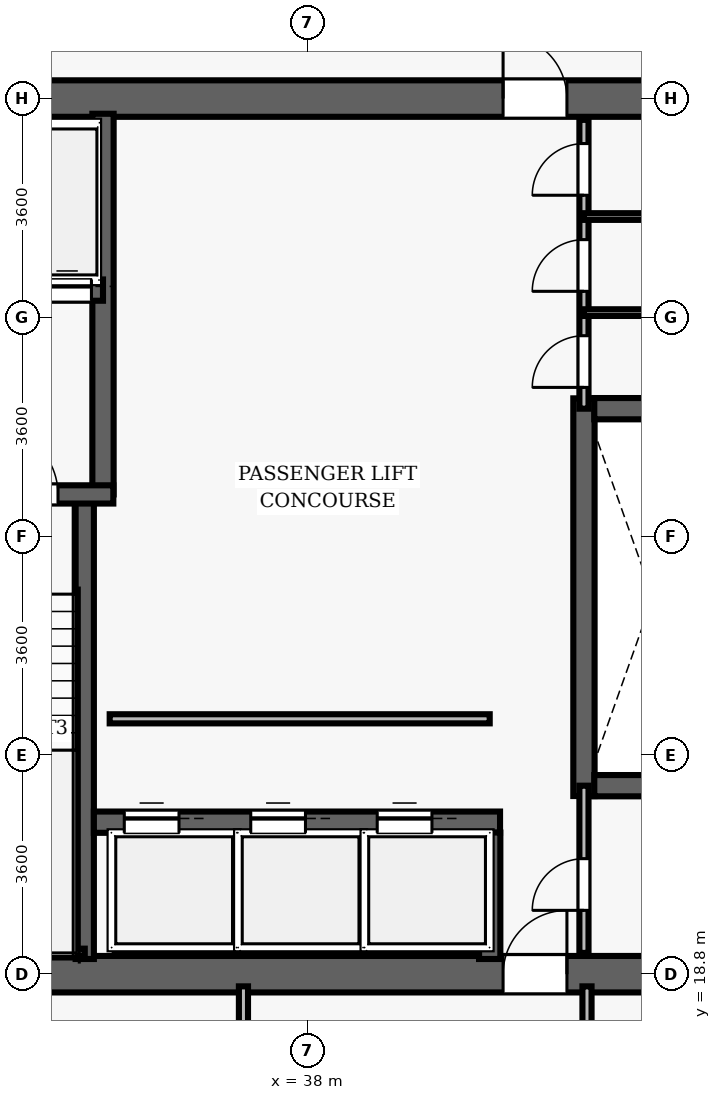
"""IFC4 building model, lengths in metres.
Left out: names, types, materials, properties, quantities, classifications, styles, units other than length and angle.
Written with IfcOpenShell. Run it as: python <this file> out.ifc"""

import sys

from ifc_helpers import new_model, si_unit, direction, frame, frame_2d, origin, place, context, subcontext, project, spatial, rectangle, extrude, element, fill, save


model = new_model("IFC4")
c1 = context("Model", 3, precision=1e-05, world=origin(), true_north=direction((0.0, 1.0)))
c2 = subcontext(c1, "Body", "Model", "MODEL_VIEW")
j1 = project(units=[si_unit("LENGTHUNIT", "METRE"), si_unit("PLANEANGLEUNIT", "RADIAN")], contexts=[c1])
p1 = place(None, origin())
s1 = spatial("IfcSite", under=j1, at=p1, CompositionType="ELEMENT")
p2 = place(p1, origin())
s2 = spatial("IfcBuilding", under=s1, at=p2, CompositionType="ELEMENT")
p3 = place(p2, frame((0.0, 0.0, 158.8)))
s3 = spatial("IfcBuildingStorey", under=s2, at=p3, CompositionType="ELEMENT", Elevation=158.8)
p4 = place(p3, frame((26.7, 18.8, 0.0), z_axis=(0.0, 0.0, 1.0), x_axis=(1.0, 0.0, 0.0)))
e1 = element("IfcWall", 1, at=p4, inside=s3, PredefinedType="SHEAR", context=c2, shape_type="SweptSolid", body=[
    extrude(rectangle(XDim=22.6, YDim=0.6, at=frame_2d((11.3, 0.0))), origin(), (0.0, 0.0, 1.0), 3.5),
])
p5 = place(p4, frame((14.52, 0.0, 0.0)))
e2 = element("IfcOpeningElement", 2, at=p5, cuts=e1, PredefinedType="OPENING", context=c2, shape_type="SweptSolid", body=[
    extrude(rectangle(XDim=1.05, YDim=2.15, at=frame_2d((0.525, 1.075))), frame((0.0, 0.31, 0.0), z_axis=(0.0, -1.0, 0.0), x_axis=(1.0, 0.0, 0.0)), (0.0, 0.0, 1.0), 0.62),
])
p6 = place(p3, frame((26.7, 33.2, 0.0), z_axis=(0.0, 0.0, 1.0), x_axis=(1.0, 0.0, 0.0)))
e3 = element("IfcWall", 3, at=p6, inside=s3, PredefinedType="SHEAR", context=c2, shape_type="SweptSolid", body=[
    extrude(rectangle(XDim=22.6, YDim=0.6, at=frame_2d((11.3, 0.0))), origin(), (0.0, 0.0, 1.0), 3.5),
])
p7 = place(p6, frame((4.62, 0.0, 0.0)))
e4 = element("IfcOpeningElement", 4, at=p7, cuts=e3, PredefinedType="OPENING", context=c2, shape_type="SweptSolid", body=[
    extrude(rectangle(XDim=1.05, YDim=2.15, at=frame_2d((0.525, 1.075))), frame((0.0, 0.31, 0.0), z_axis=(0.0, -1.0, 0.0), x_axis=(1.0, 0.0, 0.0)), (0.0, 0.0, 1.0), 0.62),
])
p8 = place(p6, frame((14.52, 0.0, 0.0)))
e5 = element("IfcOpeningElement", 5, at=p8, cuts=e3, PredefinedType="OPENING", context=c2, shape_type="SweptSolid", body=[
    extrude(rectangle(XDim=1.05, YDim=2.15, at=frame_2d((0.525, 1.075))), frame((0.0, 0.31, 0.0), z_axis=(0.0, -1.0, 0.0), x_axis=(1.0, 0.0, 0.0)), (0.0, 0.0, 1.0), 0.62),
])
p9 = place(p3, frame((34.34, 19.05, 0.0), z_axis=(0.0, 0.0, 1.0), x_axis=(0.0, 1.0, 0.0)))
e6 = element("IfcWall", 6, at=p9, inside=s3, PredefinedType="SHEAR", context=c2, shape_type="SweptSolid", body=[
    extrude(rectangle(XDim=7.5, YDim=0.3, at=frame_2d((3.75, 0.0))), origin(), (0.0, 0.0, 1.0), 3.5),
])
p10 = place(p3, frame((34.64, 26.69, 0.0), z_axis=(0.0, 0.0, 1.0), x_axis=(0.0, 1.0, 0.0)))
e7 = element("IfcWall", 7, at=p10, inside=s3, PredefinedType="SHEAR", context=c2, shape_type="SweptSolid", body=[
    extrude(rectangle(XDim=6.26, YDim=0.35, at=frame_2d((3.13, 0.0))), origin(), (0.0, 0.0, 1.0), 3.5),
])
p11 = place(p3, frame((31.25, 26.69, 0.0), z_axis=(0.0, 0.0, 1.0), x_axis=(1.0, 0.0, 0.0)))
e8 = element("IfcWall", 8, at=p11, inside=s3, PredefinedType="SHEAR", context=c2, shape_type="SweptSolid", body=[
    extrude(rectangle(XDim=3.56, YDim=0.3, at=frame_2d((1.78, 0.0))), origin(), (0.0, 0.0, 1.0), 3.5),
])
p12 = place(p11, frame((1.55, 0.0, 0.0)))
e9 = element("IfcOpeningElement", 9, at=p12, cuts=e8, PredefinedType="OPENING", context=c2, shape_type="SweptSolid", body=[
    extrude(rectangle(XDim=1.1, YDim=2.15, at=frame_2d((0.55, 1.075))), frame((0.0, 0.16, 0.0), z_axis=(0.0, -1.0, 0.0), x_axis=(1.0, 0.0, 0.0)), (0.0, 0.0, 1.0), 0.32),
])
p13 = place(p3, frame((31.3, 19.16, 0.0), z_axis=(0.0, 0.0, 1.0), x_axis=(1.0, 0.0, 0.0)))
e10 = element("IfcWall", 10, at=p13, inside=s3, PredefinedType="SHEAR", context=c2, shape_type="SweptSolid", body=[
    extrude(rectangle(XDim=3.04, YDim=0.12, at=frame_2d((1.52, 0.0))), origin(), (0.0, 0.0, 1.0), 3.5),
])
p14 = place(p3, frame((32.23, 30.05, 0.0), z_axis=(0.0, 0.0, 1.0), x_axis=(1.0, 0.0, 0.0)))
e11 = element("IfcWall", 11, at=p14, inside=s3, PredefinedType="SHEAR", context=c2, shape_type="SweptSolid", body=[
    extrude(rectangle(XDim=2.41, YDim=0.35, at=frame_2d((1.205, 0.0))), origin(), (0.0, 0.0, 1.0), 2.675),
])
p15 = place(p14, frame((0.42, 0.0, 0.0)))
e12 = element("IfcOpeningElement", 12, at=p15, cuts=e11, PredefinedType="OPENING", context=c2, shape_type="SweptSolid", body=[
    extrude(rectangle(XDim=0.8, YDim=2.15, at=frame_2d((0.4, 1.075))), frame((0.0, 0.185, 0.0), z_axis=(0.0, -1.0, 0.0), x_axis=(1.0, 0.0, 0.0)), (0.0, 0.0, 1.0), 0.37),
])
p16 = place(p14, frame((1.42, 0.0, 0.0)))
e13 = element("IfcOpeningElement", 13, at=p16, cuts=e11, PredefinedType="OPENING", context=c2, shape_type="SweptSolid", body=[
    extrude(rectangle(XDim=0.8, YDim=2.15, at=frame_2d((0.4, 1.075))), frame((0.0, 0.185, 0.0), z_axis=(0.0, -1.0, 0.0), x_axis=(1.0, 0.0, 0.0)), (0.0, 0.0, 1.0), 0.37),
])
p17 = place(p3, frame((42.55, 21.73, 0.0), z_axis=(0.0, 0.0, 1.0), x_axis=(0.0, 1.0, 0.0)))
e14 = element("IfcWall", 14, at=p17, inside=s3, PredefinedType="SHEAR", context=c2, shape_type="SweptSolid", body=[
    extrude(rectangle(XDim=6.54, YDim=0.35, at=frame_2d((3.27, 0.0))), origin(), (0.0, 0.0, 1.0), 2.675),
])
for number, where, z_axis, x_axis in (
    (15, (42.72, 21.9, 0.0), (0.0, 0.0, 1.0), (1.0, 0.0, 0.0)),
    (16, (42.72, 28.1, 0.0), (0.0, 0.0, 1.0), (1.0, 0.0, 0.0)),
):
    element("IfcWall", number, at=place(p3, frame(where, z_axis=z_axis, x_axis=x_axis)), inside=s3, PredefinedType="SHEAR", context=c2, shape_type="SweptSolid", body=[
        extrude(rectangle(XDim=2.03, YDim=0.35, at=frame_2d((1.015, 0.0))), origin(), (0.0, 0.0, 1.0), 2.675),
    ])
p18 = place(p3, frame((34.49, 21.3, 0.0), z_axis=(0.0, 0.0, 1.0), x_axis=(1.0, 0.0, 0.0)))
e17 = element("IfcWall", 17, at=p18, inside=s3, PredefinedType="SHEAR", context=c2, shape_type="SweptSolid", body=[
    extrude(rectangle(XDim=6.68, YDim=0.35, at=frame_2d((3.34, 0.0))), origin(), (0.0, 0.0, 1.0), 2.675),
])
p19 = place(p18, frame((0.5, 0.0, 0.0)))
e18 = element("IfcOpeningElement", 18, at=p19, cuts=e17, PredefinedType="OPENING", context=c2, shape_type="SweptSolid", body=[
    extrude(rectangle(XDim=0.9, YDim=2.15, at=frame_2d((0.45, 1.075))), frame((0.0, 0.185, 0.0), z_axis=(0.0, -1.0, 0.0), x_axis=(1.0, 0.0, 0.0)), (0.0, 0.0, 1.0), 0.37),
])
p20 = place(p18, frame((2.58, 0.0, 0.0)))
e19 = element("IfcOpeningElement", 19, at=p20, cuts=e17, PredefinedType="OPENING", context=c2, shape_type="SweptSolid", body=[
    extrude(rectangle(XDim=0.9, YDim=2.15, at=frame_2d((0.45, 1.075))), frame((0.0, 0.185, 0.0), z_axis=(0.0, -1.0, 0.0), x_axis=(1.0, 0.0, 0.0)), (0.0, 0.0, 1.0), 0.37),
])
p21 = place(p18, frame((4.66, 0.0, 0.0)))
e20 = element("IfcOpeningElement", 20, at=p21, cuts=e17, PredefinedType="OPENING", context=c2, shape_type="SweptSolid", body=[
    extrude(rectangle(XDim=0.9, YDim=2.15, at=frame_2d((0.45, 1.075))), frame((0.0, 0.185, 0.0), z_axis=(0.0, -1.0, 0.0), x_axis=(1.0, 0.0, 0.0)), (0.0, 0.0, 1.0), 0.37),
])
p22 = place(p3, frame((41.0, 19.05, 0.0), z_axis=(0.0, 0.0, 1.0), x_axis=(0.0, 1.0, 0.0)))
e21 = element("IfcWall", 21, at=p22, inside=s3, PredefinedType="SHEAR", context=c2, shape_type="SweptSolid", body=[
    extrude(rectangle(XDim=2.08, YDim=0.35, at=frame_2d((1.04, 0.0))), origin(), (0.0, 0.0, 1.0), 2.675),
])
p23 = place(p3, frame((34.75, 23.0, 0.0), z_axis=(0.0, 0.0, 1.0), x_axis=(1.0, 0.0, 0.0)))
e22 = element("IfcWall", 22, at=p23, inside=s3, PredefinedType="PARTITIONING", context=c2, shape_type="SweptSolid", body=[
    extrude(rectangle(XDim=6.25, YDim=0.15, at=frame_2d((3.125, 0.0))), origin(), (0.0, 0.0, 1.0), 2.675),
])
p24 = place(p3, frame((42.55, 28.1, 0.0), z_axis=(0.0, 0.0, 1.0), x_axis=(0.0, 1.0, 0.0)))
e23 = element("IfcWall", 23, at=p24, inside=s3, PredefinedType="PARTITIONING", context=c2, shape_type="SweptSolid", body=[
    extrude(rectangle(XDim=4.75, YDim=0.15, at=frame_2d((2.375, 0.0))), origin(), (0.0, 0.0, 1.0), 2.675),
])
p25 = place(p24, frame((0.35, 0.0, 0.0)))
e24 = element("IfcOpeningElement", 24, at=p25, cuts=e23, PredefinedType="OPENING", context=c2, shape_type="SweptSolid", body=[
    extrude(rectangle(XDim=0.85, YDim=2.1, at=frame_2d((0.425, 1.05))), frame((0.0, 0.085, 0.0), z_axis=(0.0, -1.0, 0.0), x_axis=(1.0, 0.0, 0.0)), (0.0, 0.0, 1.0), 0.17),
])
p26 = place(p24, frame((1.93, 0.0, 0.0)))
e25 = element("IfcOpeningElement", 25, at=p26, cuts=e23, PredefinedType="OPENING", context=c2, shape_type="SweptSolid", body=[
    extrude(rectangle(XDim=0.85, YDim=2.1, at=frame_2d((0.425, 1.05))), frame((0.0, 0.085, 0.0), z_axis=(0.0, -1.0, 0.0), x_axis=(1.0, 0.0, 0.0)), (0.0, 0.0, 1.0), 0.17),
])
p27 = place(p24, frame((3.51, 0.0, 0.0)))
e26 = element("IfcOpeningElement", 26, at=p27, cuts=e23, PredefinedType="OPENING", context=c2, shape_type="SweptSolid", body=[
    extrude(rectangle(XDim=0.85, YDim=2.1, at=frame_2d((0.425, 1.05))), frame((0.0, 0.085, 0.0), z_axis=(0.0, -1.0, 0.0), x_axis=(1.0, 0.0, 0.0)), (0.0, 0.0, 1.0), 0.17),
])
for number, where, z_axis, x_axis in (
    (27, (42.55, 29.68, 0.0), (0.0, 0.0, 1.0), (1.0, 0.0, 0.0)),
    (28, (42.55, 31.26, 0.0), (0.0, 0.0, 1.0), (1.0, 0.0, 0.0)),
):
    element("IfcWall", number, at=place(p3, frame(where, z_axis=z_axis, x_axis=x_axis)), inside=s3, PredefinedType="PARTITIONING", context=c2, shape_type="SweptSolid", body=[
        extrude(rectangle(XDim=2.2, YDim=0.11, at=frame_2d((1.1, 0.0))), origin(), (0.0, 0.0, 1.0), 2.675),
    ])
p28 = place(p3, frame((42.55, 19.15, 0.0), z_axis=(0.0, 0.0, 1.0), x_axis=(0.0, 1.0, 0.0)))
e29 = element("IfcWall", 29, at=p28, inside=s3, PredefinedType="PARTITIONING", context=c2, shape_type="SweptSolid", body=[
    extrude(rectangle(XDim=2.75, YDim=0.15, at=frame_2d((1.375, 0.0))), origin(), (0.0, 0.0, 1.0), 2.675),
])
p29 = place(p28, frame((0.7, 0.0, 0.0)))
e30 = element("IfcOpeningElement", 30, at=p29, cuts=e29, PredefinedType="OPENING", context=c2, shape_type="SweptSolid", body=[
    extrude(rectangle(XDim=0.85, YDim=2.1, at=frame_2d((0.425, 1.05))), frame((0.0, 0.085, 0.0), z_axis=(0.0, -1.0, 0.0), x_axis=(1.0, 0.0, 0.0)), (0.0, 0.0, 1.0), 0.17),
])
p30 = place(p3, frame((36.95, 11.2, 0.0), z_axis=(0.0, 0.0, 1.0), x_axis=(0.0, 1.0, 0.0)))
e31 = element("IfcWall", 31, at=p30, inside=s3, PredefinedType="PARTITIONING", context=c2, shape_type="SweptSolid", body=[
    extrude(rectangle(XDim=7.4, YDim=0.15, at=frame_2d((3.7, 0.0))), origin(), (0.0, 0.0, 1.0), 2.675),
])
p31 = place(p30, frame((5.075, 0.0, 0.0)))
e32 = element("IfcOpeningElement", 32, at=p31, cuts=e31, PredefinedType="OPENING", context=c2, shape_type="SweptSolid", body=[
    extrude(rectangle(XDim=0.95, YDim=2.15, at=frame_2d((0.475, 1.075))), frame((0.0, 0.085, 0.0), z_axis=(0.0, -1.0, 0.0), x_axis=(1.0, 0.0, 0.0)), (0.0, 0.0, 1.0), 0.17),
])
p32 = place(p3, frame((42.6, 16.65, 0.0), z_axis=(0.0, 0.0, 1.0), x_axis=(0.0, 1.0, 0.0)))
e33 = element("IfcWall", 33, at=p32, inside=s3, PredefinedType="PARTITIONING", context=c2, shape_type="SweptSolid", body=[
    extrude(rectangle(XDim=1.95, YDim=0.15, at=frame_2d((0.975, 0.0))), origin(), (0.0, 0.0, 1.0), 2.675),
])
p33 = place(p12, origin())
e34 = element("IfcDoor", 34, at=p33, inside=s3, OperationType="SINGLE_SWING_LEFT", PredefinedType="DOOR", context=c2, shape_type="SweptSolid", body=[
    extrude(rectangle(XDim=1.1, YDim=2.15, at=frame_2d((0.55, 1.075))), frame((0.0, 0.025, 0.0), z_axis=(0.0, -1.0, 0.0), x_axis=(1.0, 0.0, 0.0)), (0.0, 0.0, 1.0), 0.05),
])
fill(e9, e34)
p34 = place(p8, origin())
e35 = element("IfcDoor", 35, at=p34, inside=s3, OperationType="SINGLE_SWING_LEFT", PredefinedType="DOOR", context=c2, shape_type="SweptSolid", body=[
    extrude(rectangle(XDim=1.05, YDim=2.15, at=frame_2d((0.525, 1.075))), frame((0.0, 0.025, 0.0), z_axis=(0.0, -1.0, 0.0), x_axis=(1.0, 0.0, 0.0)), (0.0, 0.0, 1.0), 0.05),
])
fill(e5, e35)
p35 = place(p5, origin())
e36 = element("IfcDoor", 36, at=p35, inside=s3, OperationType="SINGLE_SWING_RIGHT", PredefinedType="DOOR", context=c2, shape_type="SweptSolid", body=[
    extrude(rectangle(XDim=1.05, YDim=2.15, at=frame_2d((0.525, 1.075))), frame((0.0, 0.025, 0.0), z_axis=(0.0, -1.0, 0.0), x_axis=(1.0, 0.0, 0.0)), (0.0, 0.0, 1.0), 0.05),
])
fill(e2, e36)
p36 = place(p25, origin())
e37 = element("IfcDoor", 37, at=p36, inside=s3, OperationType="SINGLE_SWING_LEFT", PredefinedType="DOOR", context=c2, shape_type="SweptSolid", body=[
    extrude(rectangle(XDim=0.85, YDim=2.1, at=frame_2d((0.425, 1.05))), frame((0.0, 0.025, 0.0), z_axis=(0.0, -1.0, 0.0), x_axis=(1.0, 0.0, 0.0)), (0.0, 0.0, 1.0), 0.05),
])
fill(e24, e37)
p37 = place(p26, origin())
e38 = element("IfcDoor", 38, at=p37, inside=s3, OperationType="SINGLE_SWING_LEFT", PredefinedType="DOOR", context=c2, shape_type="SweptSolid", body=[
    extrude(rectangle(XDim=0.85, YDim=2.1, at=frame_2d((0.425, 1.05))), frame((0.0, 0.025, 0.0), z_axis=(0.0, -1.0, 0.0), x_axis=(1.0, 0.0, 0.0)), (0.0, 0.0, 1.0), 0.05),
])
fill(e25, e38)
p38 = place(p27, origin())
e39 = element("IfcDoor", 39, at=p38, inside=s3, OperationType="SINGLE_SWING_LEFT", PredefinedType="DOOR", context=c2, shape_type="SweptSolid", body=[
    extrude(rectangle(XDim=0.85, YDim=2.1, at=frame_2d((0.425, 1.05))), frame((0.0, 0.025, 0.0), z_axis=(0.0, -1.0, 0.0), x_axis=(1.0, 0.0, 0.0)), (0.0, 0.0, 1.0), 0.05),
])
fill(e26, e39)
p39 = place(p29, origin())
e40 = element("IfcDoor", 40, at=p39, inside=s3, OperationType="SINGLE_SWING_LEFT", PredefinedType="DOOR", context=c2, shape_type="SweptSolid", body=[
    extrude(rectangle(XDim=0.85, YDim=2.1, at=frame_2d((0.425, 1.05))), frame((0.0, 0.025, 0.0), z_axis=(0.0, -1.0, 0.0), x_axis=(1.0, 0.0, 0.0)), (0.0, 0.0, 1.0), 0.05),
])
fill(e30, e40)
p40 = place(p19, origin())
e41 = element("IfcDoor", 41, at=p40, inside=s3, OperationType="SLIDING_TO_LEFT", PredefinedType="DOOR", context=c2, shape_type="SweptSolid", body=[
    extrude(rectangle(XDim=0.9, YDim=2.15, at=frame_2d((0.45, 1.075))), frame((0.0, 0.025, 0.0), z_axis=(0.0, -1.0, 0.0), x_axis=(1.0, 0.0, 0.0)), (0.0, 0.0, 1.0), 0.05),
])
fill(e18, e41)
p41 = place(p20, origin())
e42 = element("IfcDoor", 42, at=p41, inside=s3, OperationType="SLIDING_TO_LEFT", PredefinedType="DOOR", context=c2, shape_type="SweptSolid", body=[
    extrude(rectangle(XDim=0.9, YDim=2.15, at=frame_2d((0.45, 1.075))), frame((0.0, 0.025, 0.0), z_axis=(0.0, -1.0, 0.0), x_axis=(1.0, 0.0, 0.0)), (0.0, 0.0, 1.0), 0.05),
])
fill(e19, e42)
p42 = place(p21, origin())
e43 = element("IfcDoor", 43, at=p42, inside=s3, OperationType="SLIDING_TO_LEFT", PredefinedType="DOOR", context=c2, shape_type="SweptSolid", body=[
    extrude(rectangle(XDim=0.9, YDim=2.15, at=frame_2d((0.45, 1.075))), frame((0.0, 0.025, 0.0), z_axis=(0.0, -1.0, 0.0), x_axis=(1.0, 0.0, 0.0)), (0.0, 0.0, 1.0), 0.05),
])
fill(e20, e43)
p43 = place(p16, origin())
e44 = element("IfcDoor", 44, at=p43, inside=s3, OperationType="SLIDING_TO_LEFT", PredefinedType="DOOR", context=c2, shape_type="SweptSolid", body=[
    extrude(rectangle(XDim=0.8, YDim=2.15, at=frame_2d((0.4, 1.075))), frame((0.0, 0.025, 0.0), z_axis=(0.0, -1.0, 0.0), x_axis=(1.0, 0.0, 0.0)), (0.0, 0.0, 1.0), 0.05),
])
fill(e13, e44)
save(model, sys.argv[1])
